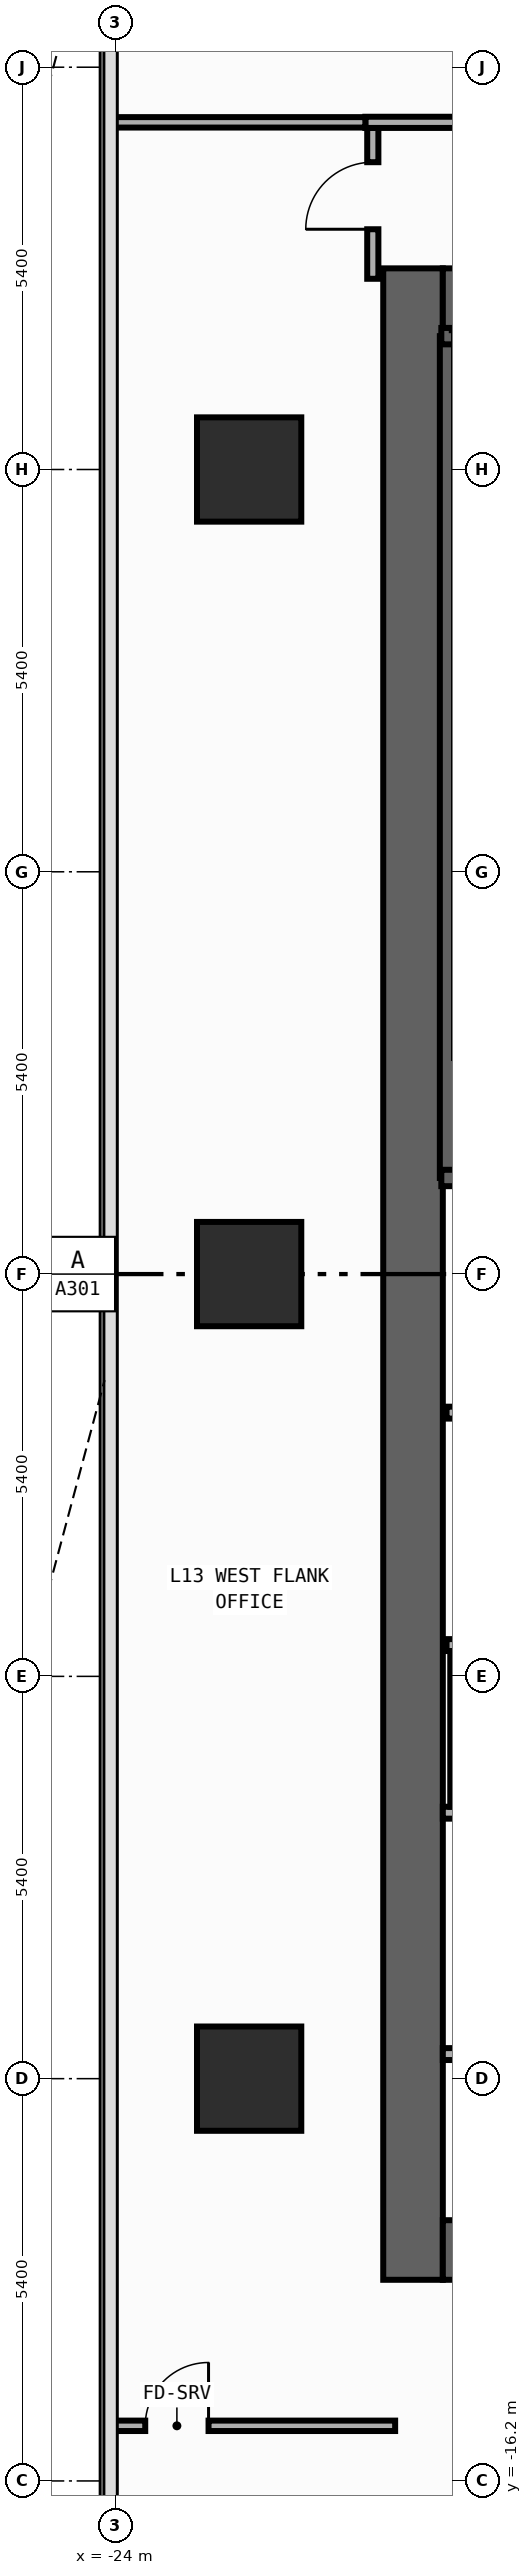
"""IFC4 building model, lengths in metres.
Left out: names, types, materials, properties, quantities, classifications, styles, units other than length and angle.
Written with IfcOpenShell. Run it as: python <this file> out.ifc"""

import sys

from ifc_helpers import new_model, si_unit, direction, frame, frame_2d, origin, origin_2d, place, context, subcontext, project, spatial, rectangle, extrude, element, fill, save


model = new_model("IFC4")
c1 = context("Model", 3, precision=1e-05, world=origin(), true_north=direction((0.0, 1.0)))
c2 = subcontext(c1, "Body", "Model", "MODEL_VIEW")
j1 = project(units=[si_unit("LENGTHUNIT", "METRE"), si_unit("PLANEANGLEUNIT", "RADIAN")], contexts=[c1])
p1 = place(None, origin())
s1 = spatial("IfcSite", under=j1, at=p1, CompositionType="ELEMENT")
p2 = place(p1, origin())
s2 = spatial("IfcBuilding", under=s1, at=p2, CompositionType="ELEMENT")
p3 = place(p2, frame((0.0, 0.0, 55.4)))
s3 = spatial("IfcBuildingStorey", under=s2, at=p3, CompositionType="ELEMENT", Elevation=55.4)
p4 = place(p3, frame((-20.0, -13.5, 0.0), z_axis=(0.0, 0.0, 1.0), x_axis=(0.0, 1.0, 0.0)))
e1 = element("IfcWall", 1, at=p4, inside=s3, PredefinedType="SHEAR", context=c2, shape_type="SweptSolid", body=[
    extrude(rectangle(XDim=27.0, YDim=0.8, at=frame_2d((13.5, 0.0))), origin(), (0.0, 0.0, 1.0), 3.94),
])
for number, where, z_axis, x_axis in (
    (2, (-19.6, -13.1, 0.0), (0.0, 0.0, 1.0), (1.0, 0.0, 0.0)),
    (3, (-19.6, 13.1, 0.0), (0.0, 0.0, 1.0), (1.0, 0.0, 0.0)),
):
    element("IfcWall", number, at=place(p3, frame(where, z_axis=z_axis, x_axis=x_axis)), inside=s3, PredefinedType="SHEAR", context=c2, shape_type="SweptSolid", body=[
        extrude(rectangle(XDim=6.8, YDim=0.8, at=frame_2d((3.4, 0.0))), origin(), (0.0, 0.0, 1.0), 3.94),
    ])
p5 = place(p3, frame((-19.53, 1.29, 0.0), z_axis=(0.0, 0.0, 1.0), x_axis=(0.0, 1.0, 0.0)))
e4 = element("IfcWall", 4, at=p5, inside=s3, PredefinedType="SHEAR", context=c2, shape_type="SweptSolid", body=[
    extrude(rectangle(XDim=11.3, YDim=0.22, at=frame_2d((5.65, 0.0))), origin(), (0.0, 0.0, 1.0), 3.94),
])
p6 = place(p3, frame((-19.62, 12.59, 0.0), z_axis=(0.0, 0.0, 1.0), x_axis=(1.0, 0.0, 0.0)))
e5 = element("IfcWall", 5, at=p6, inside=s3, PredefinedType="SHEAR", context=c2, shape_type="SweptSolid", body=[
    extrude(rectangle(XDim=3.915, YDim=0.22, at=frame_2d((1.958, 0.0))), origin(), (0.0, 0.0, 1.0), 3.94),
])
p7 = place(p3, frame((-19.62, 1.29, 0.0), z_axis=(0.0, 0.0, 1.0), x_axis=(1.0, 0.0, 0.0)))
e6 = element("IfcWall", 6, at=p7, inside=s3, PredefinedType="SHEAR", context=c2, shape_type="SweptSolid", body=[
    extrude(rectangle(XDim=3.915, YDim=0.22, at=frame_2d((1.958, 0.0))), origin(), (0.0, 0.0, 1.0), 3.94),
])
p8 = place(p7, frame((1.08, 0.0, 0.0)))
e7 = element("IfcOpeningElement", 7, at=p8, cuts=e6, PredefinedType="OPENING", context=c2, shape_type="SweptSolid", body=[
    extrude(rectangle(XDim=1.1, YDim=2.2, at=frame_2d((0.55, 1.1))), frame((0.0, 0.12, 0.0), z_axis=(0.0, -1.0, 0.0), x_axis=(1.0, 0.0, 0.0)), (0.0, 0.0, 1.0), 0.24),
])
for number, where, z_axis, x_axis in (
    (8, (-22.2, -10.8, 0.0), (0.0, 0.0, 1.0), (1.0, 0.0, 0.0)),
    (9, (-22.2, 0.0, 0.0), (0.0, 0.0, 1.0), (1.0, 0.0, 0.0)),
    (10, (-22.2, 10.8, 0.0), (0.0, 0.0, 1.0), (1.0, 0.0, 0.0)),
):
    element("IfcColumn", number, at=place(p3, frame(where, z_axis=z_axis, x_axis=x_axis)), inside=s3, PredefinedType="COLUMN", context=c2, shape_type="SweptSolid", body=[
        extrude(rectangle(XDim=1.4, YDim=1.4, at=origin_2d()), origin(), (0.0, 0.0, 1.0), 4.2),
    ])
p9 = place(p3, frame((-19.55, -1.86, 0.0), z_axis=(0.0, 0.0, 1.0), x_axis=(1.0, 0.0, 0.0)))
e11 = element("IfcWall", 11, at=p9, inside=s3, PredefinedType="STANDARD", context=c2, shape_type="SweptSolid", body=[
    extrude(rectangle(XDim=3.8, YDim=0.16, at=frame_2d((1.9, 0.0))), origin(), (0.0, 0.0, 1.0), 3.94),
])
p10 = place(p9, frame((1.18, 0.0, 0.0)))
e12 = element("IfcOpeningElement", 12, at=p10, cuts=e11, PredefinedType="OPENING", context=c2, shape_type="SweptSolid", body=[
    extrude(rectangle(XDim=1.15, YDim=2.2, at=frame_2d((0.575, 1.1))), frame((0.0, 0.09, 0.0), z_axis=(0.0, -1.0, 0.0), x_axis=(1.0, 0.0, 0.0)), (0.0, 0.0, 1.0), 0.18),
])
p11 = place(p3, frame((-19.55, -4.98, 0.0), z_axis=(0.0, 0.0, 1.0), x_axis=(1.0, 0.0, 0.0)))
e13 = element("IfcWall", 13, at=p11, inside=s3, PredefinedType="STANDARD", context=c2, shape_type="SweptSolid", body=[
    extrude(rectangle(XDim=3.8, YDim=0.16, at=frame_2d((1.9, 0.0))), origin(), (0.0, 0.0, 1.0), 3.94),
])
for number, where, z_axis, x_axis in (
    (14, (-19.6, -10.47, 0.0), (0.0, 0.0, 1.0), (1.0, 0.0, 0.0)),
    (15, (-19.6, -7.23, 0.0), (0.0, 0.0, 1.0), (1.0, 0.0, 0.0)),
):
    element("IfcWall", number, at=place(p3, frame(where, z_axis=z_axis, x_axis=x_axis)), inside=s3, PredefinedType="PARTITIONING", context=c2, shape_type="SweptSolid", body=[
        extrude(rectangle(XDim=2.29, YDim=0.16, at=frame_2d((1.145, 0.0))), origin(), (0.0, 0.0, 1.0), 3.94),
    ])
p12 = place(p3, frame((-20.54, 13.36, 0.0), z_axis=(0.0, 0.0, 1.0), x_axis=(0.0, 1.0, 0.0)))
e16 = element("IfcWall", 16, at=p12, inside=s3, PredefinedType="PARTITIONING", context=c2, shape_type="SweptSolid", body=[
    extrude(rectangle(XDim=2.025, YDim=0.15, at=frame_2d((1.012, 0.0))), origin(), (0.0, 0.0, 1.0), 3.94),
])
p13 = place(p12, frame((0.665, 0.0, 0.0)))
e17 = element("IfcOpeningElement", 17, at=p13, cuts=e16, PredefinedType="OPENING", context=c2, shape_type="SweptSolid", body=[
    extrude(rectangle(XDim=0.9, YDim=2.15, at=frame_2d((0.45, 1.075))), frame((0.0, 0.085, 0.0), z_axis=(0.0, -1.0, 0.0), x_axis=(1.0, 0.0, 0.0)), (0.0, 0.0, 1.0), 0.17),
])
p14 = place(p3, frame((-20.64, 15.46, 0.0), z_axis=(0.0, 0.0, 1.0), x_axis=(1.0, 0.0, 0.0)))
e18 = element("IfcWall", 18, at=p14, inside=s3, PredefinedType="PARTITIONING", context=c2, shape_type="SweptSolid", body=[
    extrude(rectangle(XDim=8.65, YDim=0.15, at=frame_2d((4.325, 0.0))), origin(), (0.0, 0.0, 1.0), 3.94),
])
p15 = place(p14, frame((2.871, 0.0, 0.0)))
e19 = element("IfcOpeningElement", 19, at=p15, cuts=e18, PredefinedType="OPENING", context=c2, shape_type="SweptSolid", body=[
    extrude(rectangle(XDim=0.9, YDim=2.15, at=frame_2d((0.45, 1.075))), frame((0.0, 0.085, 0.0), z_axis=(0.0, -1.0, 0.0), x_axis=(1.0, 0.0, 0.0)), (0.0, 0.0, 1.0), 0.17),
])
p16 = place(p3, frame((-24.055, 15.46, 0.0), z_axis=(0.0, 0.0, 1.0), x_axis=(1.0, 0.0, 0.0)))
e20 = element("IfcWall", 20, at=p16, inside=s3, PredefinedType="PARTITIONING", context=c2, shape_type="SweptSolid", body=[
    extrude(rectangle(XDim=3.415, YDim=0.14, at=frame_2d((1.708, 0.0))), origin(), (0.0, 0.0, 1.0), 3.94),
])
p17 = place(p3, frame((-24.055, -15.46, 0.0), z_axis=(0.0, 0.0, 1.0), x_axis=(1.0, 0.0, 0.0)))
e21 = element("IfcWall", 21, at=p17, inside=s3, PredefinedType="PARTITIONING", context=c2, shape_type="SweptSolid", body=[
    extrude(rectangle(XDim=3.815, YDim=0.14, at=frame_2d((1.907, 0.0))), origin(), (0.0, 0.0, 1.0), 3.94),
])
p18 = place(p17, frame((0.46, 0.0, 0.0)))
e22 = element("IfcOpeningElement", 22, at=p18, cuts=e21, PredefinedType="OPENING", context=c2, shape_type="SweptSolid", body=[
    extrude(rectangle(XDim=0.85, YDim=2.1, at=frame_2d((0.425, 1.05))), frame((0.0, 0.08, 0.0), z_axis=(0.0, -1.0, 0.0), x_axis=(1.0, 0.0, 0.0)), (0.0, 0.0, 1.0), 0.16),
])
p19 = place(p3, frame((-19.45, -7.15, 0.0), z_axis=(0.0, 0.0, 1.0), x_axis=(0.0, 1.0, 0.0)))
e23 = element("IfcWall", 23, at=p19, inside=s3, PredefinedType="PARTITIONING", context=c2, shape_type="SweptSolid", body=[
    extrude(rectangle(XDim=2.09, YDim=0.1, at=frame_2d((1.045, 0.0))), origin(), (0.0, 0.0, 1.0), 3.94),
])
p20 = place(p13, origin())
e24 = element("IfcDoor", 24, at=p20, inside=s3, OperationType="SINGLE_SWING_LEFT", PredefinedType="DOOR", context=c2, shape_type="SweptSolid", body=[
    extrude(rectangle(XDim=0.9, YDim=2.15, at=frame_2d((0.45, 1.075))), frame((0.0, 0.025, 0.0), z_axis=(0.0, -1.0, 0.0), x_axis=(1.0, 0.0, 0.0)), (0.0, 0.0, 1.0), 0.05),
])
fill(e17, e24)
p21 = place(p18, origin())
e25 = element("IfcDoor", 25, at=p21, inside=s3, OperationType="SINGLE_SWING_RIGHT", PredefinedType="DOOR", context=c2, shape_type="SweptSolid", body=[
    extrude(rectangle(XDim=0.85, YDim=2.1, at=frame_2d((0.425, 1.05))), frame((0.0, 0.025, 0.0), z_axis=(0.0, -1.0, 0.0), x_axis=(1.0, 0.0, 0.0)), (0.0, 0.0, 1.0), 0.05),
])
fill(e22, e25)
save(model, sys.argv[1])
